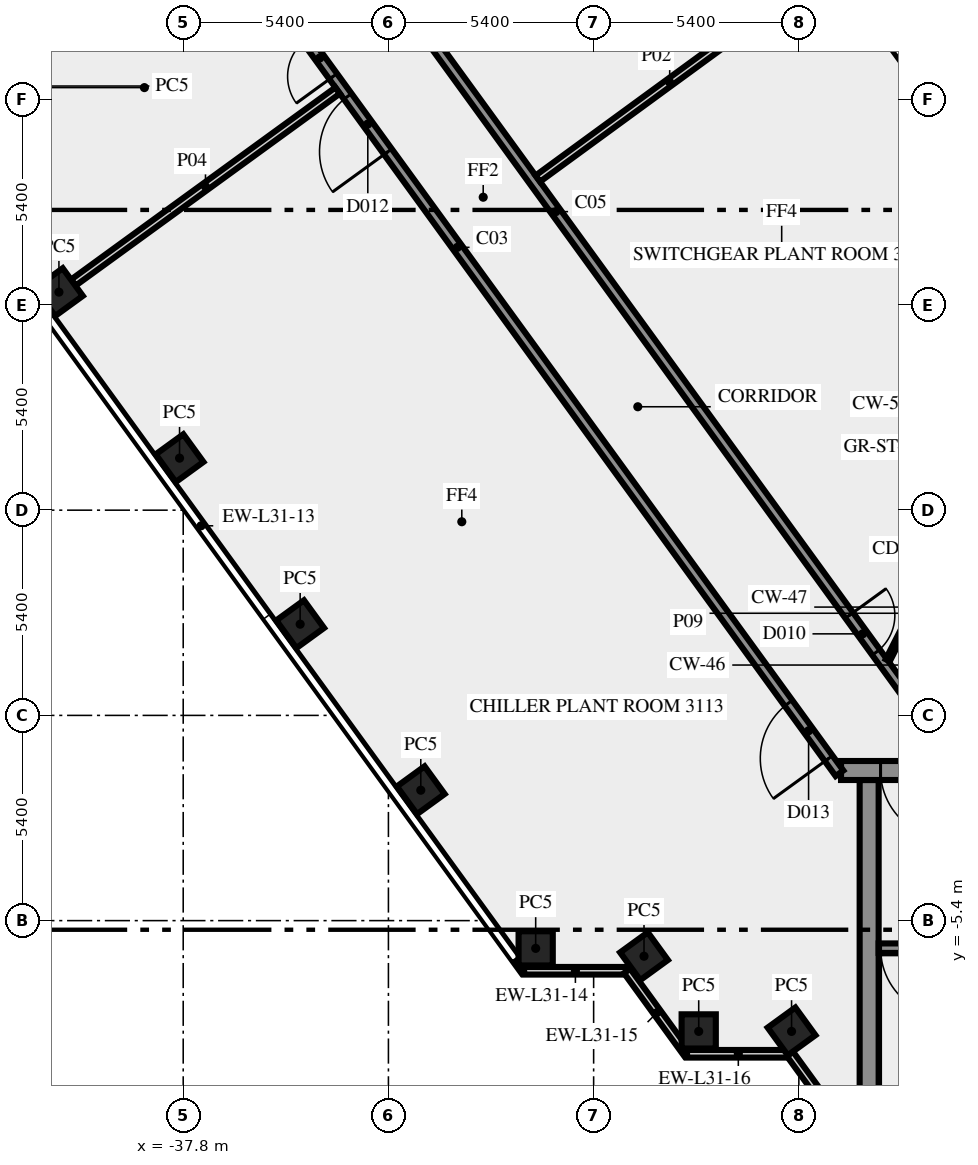
"""IFC4 building model, lengths in metres.
Left out: names, types, materials, properties, quantities, classifications, styles, units other than length and angle.
Written with IfcOpenShell. Run it as: python <this file> out.ifc"""

import sys

from ifc_helpers import new_model, si_unit, direction, frame, frame_2d, origin, origin_2d, place, context, subcontext, project, spatial, rectangle, extrude, element, fill, save


model = new_model("IFC4")
c1 = context("Model", 3, precision=1e-05, world=origin(), true_north=direction((0.0, 1.0)))
c2 = subcontext(c1, "Body", "Model", "MODEL_VIEW")
j1 = project(units=[si_unit("LENGTHUNIT", "METRE"), si_unit("PLANEANGLEUNIT", "RADIAN")], contexts=[c1])
p1 = place(None, origin())
s1 = spatial("IfcSite", under=j1, at=p1, CompositionType="ELEMENT")
p2 = place(p1, origin())
s2 = spatial("IfcBuilding", under=s1, at=p2, CompositionType="ELEMENT")
p3 = place(p2, frame((0.0, 0.0, 133.0)))
s3 = spatial("IfcBuildingStorey", under=s2, at=p3, CompositionType="ELEMENT", Elevation=133.0)
for number, where, z_axis, x_axis in (
    (1, (-41.07, 11.137, 0.0), (0.0, 0.0, 1.0), (0.588, -0.809, 0.0)),
    (2, (-37.896, 6.769, 0.0), (0.0, 0.0, 1.0), (0.588, -0.809, 0.0)),
    (3, (-34.722, 2.4, 0.0), (0.0, 0.0, 1.0), (0.588, -0.809, 0.0)),
    (4, (-31.548, -1.969, 0.0), (0.0, 0.0, 1.0), (0.588, -0.809, 0.0)),
    (5, (-28.525, -6.13, 0.0), (0.0, 0.0, 1.0), (1.0, 0.0, 0.0)),
    (6, (-25.674, -6.337, 0.0), (0.0, 0.0, 1.0), (0.588, -0.809, 0.0)),
    (7, (-24.235, -8.315, 0.0), (0.0, 0.0, 1.0), (1.0, 0.0, 0.0)),
    (8, (-21.792, -8.315, 0.0), (0.0, 0.0, 1.0), (0.588, -0.809, 0.0)),
):
    element("IfcColumn", number, at=place(p3, frame(where, z_axis=z_axis, x_axis=x_axis)), inside=s3, PredefinedType="COLUMN", context=c2, shape_type="SweptSolid", body=[
        extrude(rectangle(XDim=0.9, YDim=0.9, at=origin_2d()), origin(), (0.0, 0.0, 1.0), 5.6),
    ])
p4 = place(p3, frame((-14.354, 11.093, 0.0), z_axis=(0.0, 0.0, 1.0), x_axis=(-0.587790518608, 0.809013168147, 0.0)))
e9 = element("IfcWall", 9, at=p4, inside=s3, PredefinedType="SOLIDWALL", context=c2, shape_type="SweptSolid", body=[
    extrude(rectangle(XDim=23.044, YDim=0.2, at=frame_2d((11.522, 0.0))), origin(), (0.0, 0.0, 1.0), 5.6),
])
p5 = place(p3, frame((-45.84, 16.701, 0.0), z_axis=(0.0, 0.0, 1.0), x_axis=(0.587788110303, -0.809014917901, 0.0)))
e10 = element("IfcWall", 10, at=p5, inside=s3, PredefinedType="SOLIDWALL", context=c2, shape_type="SweptSolid", body=[
    extrude(rectangle(XDim=28.956, YDim=0.2, at=frame_2d((14.478, 0.0))), origin(), (0.0, 0.0, 1.0), 5.6),
])
p6 = place(p3, frame((-28.83, -6.719, 0.0), z_axis=(0.0, 0.0, 1.0), x_axis=(1.0, 0.0, 0.0)))
e11 = element("IfcWall", 11, at=p6, inside=s3, PredefinedType="SOLIDWALL", context=c2, shape_type="SweptSolid", body=[
    extrude(rectangle(XDim=2.7, YDim=0.2, at=frame_2d((1.35, 0.0))), origin(), (0.0, 0.0, 1.0), 5.6),
])
p7 = place(p3, frame((-26.12, -6.724, 0.0), z_axis=(0.0, 0.0, 1.0), x_axis=(0.587720002413, -0.809064397168, 0.0)))
e12 = element("IfcWall", 12, at=p7, inside=s3, PredefinedType="SOLIDWALL", context=c2, shape_type="SweptSolid", body=[
    extrude(rectangle(XDim=2.7, YDim=0.2, at=frame_2d((1.35, 0.0))), origin(), (0.0, 0.0, 1.0), 5.6),
])
p8 = place(p3, frame((-24.543, -8.904, 0.0), z_axis=(0.0, 0.0, 1.0), x_axis=(1.0, 0.0, 0.0)))
e13 = element("IfcWall", 13, at=p8, inside=s3, PredefinedType="SOLIDWALL", context=c2, shape_type="SweptSolid", body=[
    extrude(rectangle(XDim=2.7, YDim=0.2, at=frame_2d((1.35, 0.0))), origin(), (0.0, 0.0, 1.0), 5.6),
])
p9 = place(p3, frame((-21.833, -8.909, 0.0), z_axis=(0.0, 0.0, 1.0), x_axis=(0.587766567315, -0.809030569476, 0.0)))
e14 = element("IfcWall", 14, at=p9, inside=s3, PredefinedType="SOLIDWALL", context=c2, shape_type="SweptSolid", body=[
    extrude(rectangle(XDim=2.688, YDim=0.2, at=frame_2d((1.344, 0.0))), origin(), (0.0, 0.0, 1.0), 5.6),
])
p10 = place(p3, frame((-19.75, -10.5, 0.0), z_axis=(0.0, 0.0, 1.0), x_axis=(0.0, 1.0, 0.0)))
e15 = element("IfcWall", 15, at=p10, inside=s3, PredefinedType="SHEAR", context=c2, shape_type="SweptSolid", body=[
    extrude(rectangle(XDim=8.8, YDim=0.5, at=frame_2d((4.4, 0.0))), origin(), (0.0, 0.0, 1.0), 5.6),
])
p11 = place(p3, frame((-11.45, -6.125, 0.0), z_axis=(0.0, 0.0, 1.0), x_axis=(-1.0, 0.0, 0.0)))
e16 = element("IfcWall", 16, at=p11, inside=s3, PredefinedType="SHEAR", context=c2, shape_type="SweptSolid", body=[
    extrude(rectangle(XDim=8.05, YDim=0.25, at=frame_2d((4.025, 0.0))), origin(), (0.0, 0.0, 1.0), 5.6),
])
p12 = place(p11, frame((6.2, 0.0, 0.0)))
e17 = element("IfcOpeningElement", 17, at=p12, cuts=e16, PredefinedType="OPENING", context=c2, shape_type="SweptSolid", body=[
    extrude(rectangle(XDim=1.8, YDim=2.1, at=frame_2d((0.9, 1.05))), frame((0.0, 0.135, 0.0), z_axis=(0.0, -1.0, 0.0), x_axis=(1.0, 0.0, 0.0)), (0.0, 0.0, 1.0), 0.27),
])
p13 = place(p3, frame((20.49, -1.45, 0.0), z_axis=(0.0, 0.0, 1.0), x_axis=(-1.0, 0.0, 0.0)))
e18 = element("IfcWall", 18, at=p13, inside=s3, PredefinedType="SHEAR", context=c2, shape_type="SweptSolid", body=[
    extrude(rectangle(XDim=40.98, YDim=0.5, at=frame_2d((20.49, 0.0))), origin(), (0.0, 0.0, 1.0), 5.6),
])
p14 = place(p13, frame((38.14, 0.0, 0.0)))
e19 = element("IfcOpeningElement", 19, at=p14, cuts=e18, PredefinedType="OPENING", context=c2, shape_type="SweptSolid", body=[
    extrude(rectangle(XDim=1.8, YDim=2.1, at=frame_2d((0.9, 1.05))), frame((0.0, 0.26, 0.0), z_axis=(0.0, -1.0, 0.0), x_axis=(1.0, 0.0, 0.0)), (0.0, 0.0, 1.0), 0.52),
])
p15 = place(p13, frame((35.89, 0.0, 0.0)))
e20 = element("IfcOpeningElement", 20, at=p15, cuts=e18, PredefinedType="OPENING", context=c2, shape_type="SweptSolid", body=[
    extrude(rectangle(XDim=0.9, YDim=2.1, at=frame_2d((0.45, 1.05))), frame((0.0, 0.26, 0.0), z_axis=(0.0, -1.0, 0.0), x_axis=(1.0, 0.0, 0.0)), (0.0, 0.0, 1.0), 0.52),
])
p16 = place(p13, frame((32.94, 0.0, 0.0)))
e21 = element("IfcOpeningElement", 21, at=p16, cuts=e18, PredefinedType="OPENING", context=c2, shape_type="SweptSolid", body=[
    extrude(rectangle(XDim=0.9, YDim=2.1, at=frame_2d((0.45, 1.05))), frame((0.0, 0.26, 0.0), z_axis=(0.0, -1.0, 0.0), x_axis=(1.0, 0.0, 0.0)), (0.0, 0.0, 1.0), 0.52),
])
p17 = place(p13, frame((19.59, 0.0, 0.0)))
e22 = element("IfcOpeningElement", 22, at=p17, cuts=e18, PredefinedType="OPENING", context=c2, shape_type="SweptSolid", body=[
    extrude(rectangle(XDim=2.0, YDim=2.1, at=frame_2d((1.0, 1.05))), frame((0.0, 0.26, 0.0), z_axis=(0.0, -1.0, 0.0), x_axis=(1.0, 0.0, 0.0)), (0.0, 0.0, 1.0), 0.52),
])
p18 = place(p13, frame((7.14, 0.0, 0.0)))
e23 = element("IfcOpeningElement", 23, at=p18, cuts=e18, PredefinedType="OPENING", context=c2, shape_type="SweptSolid", body=[
    extrude(rectangle(XDim=0.9, YDim=2.1, at=frame_2d((0.45, 1.05))), frame((0.0, 0.26, 0.0), z_axis=(0.0, -1.0, 0.0), x_axis=(1.0, 0.0, 0.0)), (0.0, 0.0, 1.0), 0.52),
])
p19 = place(p13, frame((5.028, 0.0, 0.0)))
e24 = element("IfcOpeningElement", 24, at=p19, cuts=e18, PredefinedType="OPENING", context=c2, shape_type="SweptSolid", body=[
    extrude(rectangle(XDim=0.8, YDim=2.1, at=frame_2d((0.4, 1.05))), frame((0.0, 0.26, 0.0), z_axis=(0.0, -1.0, 0.0), x_axis=(1.0, 0.0, 0.0)), (0.0, 0.0, 1.0), 0.52),
])
p20 = place(p13, frame((3.452, 0.0, 0.0)))
e25 = element("IfcOpeningElement", 25, at=p20, cuts=e18, PredefinedType="OPENING", context=c2, shape_type="SweptSolid", body=[
    extrude(rectangle(XDim=0.8, YDim=2.1, at=frame_2d((0.4, 1.05))), frame((0.0, 0.26, 0.0), z_axis=(0.0, -1.0, 0.0), x_axis=(1.0, 0.0, 0.0)), (0.0, 0.0, 1.0), 0.52),
])
p21 = place(p13, frame((1.04, 0.0, 0.0)))
e26 = element("IfcOpeningElement", 26, at=p21, cuts=e18, PredefinedType="OPENING", context=c2, shape_type="SweptSolid", body=[
    extrude(rectangle(XDim=1.8, YDim=2.1, at=frame_2d((0.9, 1.05))), frame((0.0, 0.26, 0.0), z_axis=(0.0, -1.0, 0.0), x_axis=(1.0, 0.0, 0.0)), (0.0, 0.0, 1.0), 0.52),
])
p22 = place(p3, frame((-20.531, -1.523, 0.0), z_axis=(0.0, 0.0, 1.0), x_axis=(-0.587786778139, 0.80901588578, 0.0)))
e27 = element("IfcWall", 27, at=p22, inside=s3, PredefinedType="SOLIDWALL", context=c2, shape_type="SweptSolid", body=[
    extrude(rectangle(XDim=34.212, YDim=0.25, at=frame_2d((17.106, 0.0))), origin(), (0.0, 0.0, 1.0), 5.6),
])
p23 = place(p22, frame((20.216, 0.0, 0.0)))
e28 = element("IfcOpeningElement", 28, at=p23, cuts=e27, PredefinedType="OPENING", context=c2, shape_type="SweptSolid", body=[
    extrude(rectangle(XDim=1.8, YDim=2.1, at=frame_2d((0.9, 1.05))), frame((0.0, 0.135, 0.0), z_axis=(0.0, -1.0, 0.0), x_axis=(1.0, 0.0, 0.0)), (0.0, 0.0, 1.0), 0.27),
])
p24 = place(p22, frame((0.483, 0.0, 0.0)))
e29 = element("IfcOpeningElement", 29, at=p24, cuts=e27, PredefinedType="OPENING", context=c2, shape_type="SweptSolid", body=[
    extrude(rectangle(XDim=1.8, YDim=2.1, at=frame_2d((0.9, 1.05))), frame((0.0, 0.135, 0.0), z_axis=(0.0, -1.0, 0.0), x_axis=(1.0, 0.0, 0.0)), (0.0, 0.0, 1.0), 0.27),
])
p25 = place(p22, frame((22.665, 0.0, 0.0)))
e30 = element("IfcOpeningElement", 30, at=p25, cuts=e27, PredefinedType="OPENING", context=c2, shape_type="SweptSolid", body=[
    extrude(rectangle(XDim=1.2, YDim=2.1, at=frame_2d((0.6, 1.05))), frame((0.0, 0.135, 0.0), z_axis=(0.0, -1.0, 0.0), x_axis=(1.0, 0.0, 0.0)), (0.0, 0.0, 1.0), 0.27),
])
p26 = place(p3, frame((-38.44, 27.635, 0.0), z_axis=(0.0, 0.0, 1.0), x_axis=(0.587787785895, -0.809015153599, 0.0)))
e31 = element("IfcWall", 31, at=p26, inside=s3, PredefinedType="SOLIDWALL", context=c2, shape_type="SweptSolid", body=[
    extrude(rectangle(XDim=35.549, YDim=0.25, at=frame_2d((17.775, 0.0))), origin(), (0.0, 0.0, 1.0), 5.6),
])
p27 = place(p26, frame((1.046, 0.0, 0.0)))
e32 = element("IfcOpeningElement", 32, at=p27, cuts=e31, PredefinedType="OPENING", context=c2, shape_type="SweptSolid", body=[
    extrude(rectangle(XDim=1.2, YDim=2.1, at=frame_2d((0.6, 1.05))), frame((0.0, 0.135, 0.0), z_axis=(0.0, -1.0, 0.0), x_axis=(1.0, 0.0, 0.0)), (0.0, 0.0, 1.0), 0.27),
])
p28 = place(p26, frame((30.907, 0.0, 0.0)))
e33 = element("IfcOpeningElement", 33, at=p28, cuts=e31, PredefinedType="OPENING", context=c2, shape_type="SweptSolid", body=[
    extrude(rectangle(XDim=1.2, YDim=2.1, at=frame_2d((0.6, 1.05))), frame((0.0, 0.135, 0.0), z_axis=(0.0, -1.0, 0.0), x_axis=(1.0, 0.0, 0.0)), (0.0, 0.0, 1.0), 0.27),
])
p29 = place(p3, frame((-28.469, 14.124, 0.0), z_axis=(0.0, 0.0, 1.0), x_axis=(0.807513406154, 0.589849217074, 0.0)))
e34 = element("IfcWall", 34, at=p29, inside=s3, PredefinedType="SOLIDWALL", context=c2, shape_type="SweptSolid", body=[
    extrude(rectangle(XDim=8.595, YDim=0.2, at=frame_2d((4.298, 0.0))), origin(), (0.0, 0.0, 1.0), 5.6),
])
p30 = place(p3, frame((-33.737, 16.441, 0.0), z_axis=(0.0, 0.0, 1.0), x_axis=(-0.80896572488, -0.587855812227, 0.0)))
e35 = element("IfcWall", 35, at=p30, inside=s3, PredefinedType="SOLIDWALL", context=c2, shape_type="SweptSolid", body=[
    extrude(rectangle(XDim=8.595, YDim=0.2, at=frame_2d((4.297, 0.0))), origin(), (0.0, 0.0, 1.0), 5.6),
])
p31 = place(p3, frame((-19.261, 1.45, 0.0), z_axis=(0.0, 0.0, 1.0), x_axis=(0.453950796792, 0.891026752736, 0.0)))
e36 = element("IfcWall", 36, at=p31, inside=s3, PredefinedType="PARTITIONING", context=c2, shape_type="SweptSolid", body=[
    extrude(rectangle(XDim=2.778, YDim=0.12, at=frame_2d((1.389, 0.0))), origin(), (0.0, 0.0, 1.0), 5.6),
])
p32 = place(p12, origin())
e37 = element("IfcDoor", 37, at=p32, inside=s3, OperationType="DOUBLE_DOOR_SINGLE_SWING", PredefinedType="DOOR", context=c2, shape_type="SweptSolid", body=[
    extrude(rectangle(XDim=1.8, YDim=2.1, at=frame_2d((0.9, 1.05))), frame((0.0, 0.025, 0.0), z_axis=(0.0, -1.0, 0.0), x_axis=(1.0, 0.0, 0.0)), (0.0, 0.0, 1.0), 0.05),
])
fill(e17, e37)
p33 = place(p14, origin())
e38 = element("IfcDoor", 38, at=p33, inside=s3, OperationType="DOUBLE_DOOR_SINGLE_SWING", PredefinedType="DOOR", context=c2, shape_type="SweptSolid", body=[
    extrude(rectangle(XDim=1.8, YDim=2.1, at=frame_2d((0.9, 1.05))), frame((0.0, 0.025, 0.0), z_axis=(0.0, -1.0, 0.0), x_axis=(1.0, 0.0, 0.0)), (0.0, 0.0, 1.0), 0.05),
])
fill(e19, e38)
p34 = place(p23, origin())
e39 = element("IfcDoor", 39, at=p34, inside=s3, OperationType="DOUBLE_DOOR_SINGLE_SWING", PredefinedType="DOOR", context=c2, shape_type="SweptSolid", body=[
    extrude(rectangle(XDim=1.8, YDim=2.1, at=frame_2d((0.9, 1.05))), frame((0.0, 0.025, 0.0), z_axis=(0.0, -1.0, 0.0), x_axis=(1.0, 0.0, 0.0)), (0.0, 0.0, 1.0), 0.05),
])
fill(e28, e39)
p35 = place(p24, origin())
e40 = element("IfcDoor", 40, at=p35, inside=s3, OperationType="DOUBLE_DOOR_SINGLE_SWING", PredefinedType="DOOR", context=c2, shape_type="SweptSolid", body=[
    extrude(rectangle(XDim=1.8, YDim=2.1, at=frame_2d((0.9, 1.05))), frame((0.0, 0.025, 0.0), z_axis=(0.0, -1.0, 0.0), x_axis=(1.0, 0.0, 0.0)), (0.0, 0.0, 1.0), 0.05),
])
fill(e29, e40)
p36 = place(p28, origin())
e41 = element("IfcDoor", 41, at=p36, inside=s3, OperationType="SINGLE_SWING_RIGHT", PredefinedType="DOOR", context=c2, shape_type="SweptSolid", body=[
    extrude(rectangle(XDim=1.2, YDim=2.1, at=frame_2d((0.6, 1.05))), frame((0.0, 0.025, 0.0), z_axis=(0.0, -1.0, 0.0), x_axis=(1.0, 0.0, 0.0)), (0.0, 0.0, 1.0), 0.05),
])
fill(e33, e41)
p37 = place(p25, origin())
e42 = element("IfcDoor", 42, at=p37, inside=s3, OperationType="SINGLE_SWING_LEFT", PredefinedType="DOOR", context=c2, shape_type="SweptSolid", body=[
    extrude(rectangle(XDim=1.2, YDim=2.1, at=frame_2d((0.6, 1.05))), frame((0.0, 0.025, 0.0), z_axis=(0.0, -1.0, 0.0), x_axis=(1.0, 0.0, 0.0)), (0.0, 0.0, 1.0), 0.05),
])
fill(e30, e42)
save(model, sys.argv[1])
